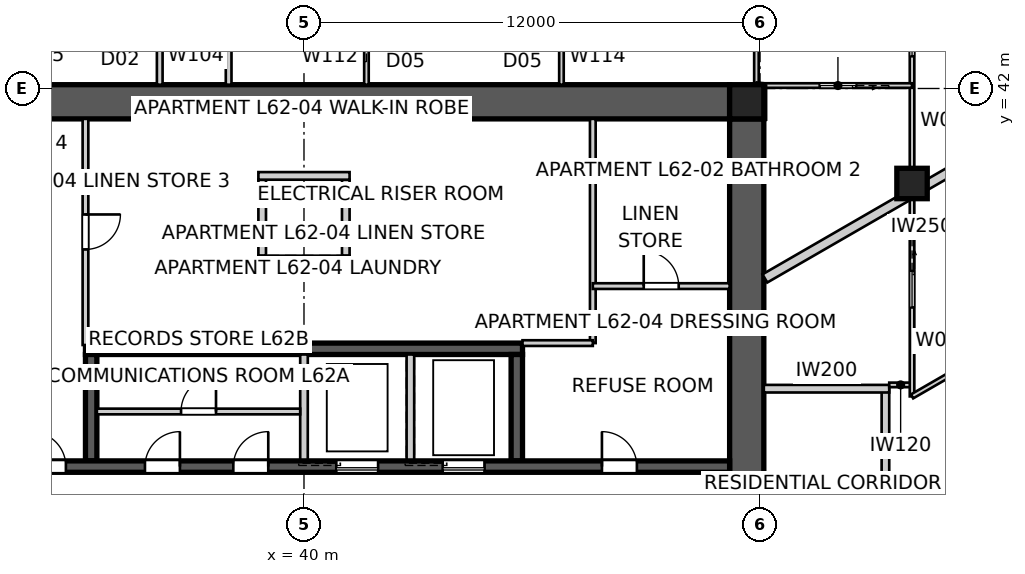
"""IFC4 building model, lengths in metres.
Left out: names, types, materials, properties, quantities, classifications, styles, units other than length and angle.
Written with IfcOpenShell. Run it as: python <this file> out.ifc"""

import sys

from ifc_helpers import new_model, si_unit, direction, frame, frame_2d, origin, origin_2d, place, context, subcontext, project, spatial, polyline, rectangle, outline, extrude, element, fill, save


model = new_model("IFC4")
c1 = context("Model", 3, precision=1e-05, world=origin(), true_north=direction((0.0, 1.0)))
c2 = subcontext(c1, "Body", "Model", "MODEL_VIEW")
j1 = project(units=[si_unit("LENGTHUNIT", "METRE"), si_unit("PLANEANGLEUNIT", "RADIAN")], contexts=[c1])
p1 = place(None, origin())
s1 = spatial("IfcSite", under=j1, at=p1, CompositionType="ELEMENT")
p2 = place(p1, origin())
s2 = spatial("IfcBuilding", under=s1, at=p2, CompositionType="ELEMENT")
p3 = place(p2, frame((0.0, 0.0, 225.2)))
s3 = spatial("IfcBuildingStorey", under=s2, at=p3, CompositionType="ELEMENT", Elevation=225.2)
p4 = place(p3, frame((28.8, 41.65, 0.0), z_axis=(0.0, 0.0, 1.0), x_axis=(1.0, 0.0, 0.0)))
e1 = element("IfcWall", 1, at=p4, inside=s3, PredefinedType="SHEAR", context=c2, shape_type="SweptSolid", body=[
    extrude(outline(polyline([(0.0, -0.45), (22.4, -0.45), (22.4, -0.025), (22.85, -0.025), (22.85, 0.025), (22.4, 0.025), (22.4, 0.45), (0.0, 0.45), (0.0, 0.025), (-0.45, 0.025), (-0.45, -0.025), (0.0, -0.025), (0.0, -0.45)])), origin(), (0.0, 0.0, 1.0), 3.4),
])
p5 = place(p3, frame((51.65, 18.8, 0.0), z_axis=(0.0, 0.0, 1.0), x_axis=(0.0, 1.0, 0.0)))
e2 = element("IfcWall", 2, at=p5, inside=s3, PredefinedType="SHEAR", context=c2, shape_type="SweptSolid", body=[
    extrude(outline(polyline([(0.0, -0.45), (22.4, -0.45), (22.4, -0.025), (22.85, -0.025), (22.85, 0.025), (22.4, 0.025), (22.4, 0.45), (0.0, 0.45), (0.0, 0.025), (-0.45, 0.025), (-0.45, -0.025), (0.0, -0.025), (0.0, -0.45)])), origin(), (0.0, 0.0, 1.0), 3.4),
])
p6 = place(p5, frame((11.14, 0.0, 0.0)))
e3 = element("IfcOpeningElement", 3, at=p6, cuts=e2, PredefinedType="OPENING", context=c2, shape_type="SweptSolid", body=[
    extrude(rectangle(XDim=1.02, YDim=2.4, at=frame_2d((0.51, 1.2))), frame((0.0, 0.46, 0.0), z_axis=(0.0, -1.0, 0.0), x_axis=(1.0, 0.0, 0.0)), (0.0, 0.0, 1.0), 0.92),
])
p7 = place(p3, frame((28.8, 32.05, 0.0), z_axis=(0.0, 0.0, 1.0), x_axis=(1.0, 0.0, 0.0)))
e4 = element("IfcWall", 4, at=p7, inside=s3, PredefinedType="SHEAR", context=c2, shape_type="SweptSolid", body=[
    extrude(rectangle(XDim=22.4, YDim=0.3, at=frame_2d((11.2, 0.0))), origin(), (0.0, 0.0, 1.0), 3.4),
])
p8 = place(p7, frame((19.04, 0.0, 0.0)))
e5 = element("IfcOpeningElement", 5, at=p8, cuts=e4, PredefinedType="OPENING", context=c2, shape_type="SweptSolid", body=[
    extrude(rectangle(XDim=0.92, YDim=2.1, at=frame_2d((0.46, 1.05))), frame((0.0, 0.16, 0.0), z_axis=(0.0, -1.0, 0.0), x_axis=(1.0, 0.0, 0.0)), (0.0, 0.0, 1.0), 0.32),
])
p9 = place(p7, frame((1.265, 0.0, 0.0)))
e6 = element("IfcOpeningElement", 6, at=p9, cuts=e4, PredefinedType="OPENING", context=c2, shape_type="SweptSolid", body=[
    extrude(rectangle(XDim=1.02, YDim=2.1, at=frame_2d((0.51, 1.05))), frame((0.0, 0.16, 0.0), z_axis=(0.0, -1.0, 0.0), x_axis=(1.0, 0.0, 0.0)), (0.0, 0.0, 1.0), 0.32),
])
p10 = place(p7, frame((4.015, 0.0, 0.0)))
e7 = element("IfcOpeningElement", 7, at=p10, cuts=e4, PredefinedType="OPENING", context=c2, shape_type="SweptSolid", body=[
    extrude(rectangle(XDim=0.92, YDim=2.1, at=frame_2d((0.46, 1.05))), frame((0.0, 0.16, 0.0), z_axis=(0.0, -1.0, 0.0), x_axis=(1.0, 0.0, 0.0)), (0.0, 0.0, 1.0), 0.32),
])
p11 = place(p7, frame((7.015, 0.0, 0.0)))
e8 = element("IfcOpeningElement", 8, at=p11, cuts=e4, PredefinedType="OPENING", context=c2, shape_type="SweptSolid", body=[
    extrude(rectangle(XDim=0.92, YDim=2.1, at=frame_2d((0.46, 1.05))), frame((0.0, 0.16, 0.0), z_axis=(0.0, -1.0, 0.0), x_axis=(1.0, 0.0, 0.0)), (0.0, 0.0, 1.0), 0.32),
])
p12 = place(p7, frame((9.34, 0.0, 0.0)))
e9 = element("IfcOpeningElement", 9, at=p12, cuts=e4, PredefinedType="OPENING", context=c2, shape_type="SweptSolid", body=[
    extrude(rectangle(XDim=0.92, YDim=2.1, at=frame_2d((0.46, 1.05))), frame((0.0, 0.16, 0.0), z_axis=(0.0, -1.0, 0.0), x_axis=(1.0, 0.0, 0.0)), (0.0, 0.0, 1.0), 0.32),
])
p13 = place(p7, frame((12.05, 0.0, 0.0)))
e10 = element("IfcOpeningElement", 10, at=p13, cuts=e4, PredefinedType="OPENING", context=c2, shape_type="SweptSolid", body=[
    extrude(rectangle(XDim=1.1, YDim=2.1, at=frame_2d((0.55, 1.05))), frame((0.0, 0.16, 0.0), z_axis=(0.0, -1.0, 0.0), x_axis=(1.0, 0.0, 0.0)), (0.0, 0.0, 1.0), 0.32),
])
p14 = place(p7, frame((14.85, 0.0, 0.0)))
e11 = element("IfcOpeningElement", 11, at=p14, cuts=e4, PredefinedType="OPENING", context=c2, shape_type="SweptSolid", body=[
    extrude(rectangle(XDim=1.1, YDim=2.1, at=frame_2d((0.55, 1.05))), frame((0.0, 0.16, 0.0), z_axis=(0.0, -1.0, 0.0), x_axis=(1.0, 0.0, 0.0)), (0.0, 0.0, 1.0), 0.32),
])
p15 = place(p3, frame((34.25, 35.15, 0.0), z_axis=(0.0, 0.0, 1.0), x_axis=(1.0, 0.0, 0.0)))
e12 = element("IfcWall", 12, at=p15, inside=s3, PredefinedType="SHEAR", context=c2, shape_type="SweptSolid", body=[
    extrude(rectangle(XDim=11.5, YDim=0.3, at=frame_2d((5.75, 0.0))), origin(), (0.0, 0.0, 1.0), 3.4),
])
p16 = place(p3, frame((34.4, 32.2, 0.0), z_axis=(0.0, 0.0, 1.0), x_axis=(0.0, 1.0, 0.0)))
e13 = element("IfcWall", 13, at=p16, inside=s3, PredefinedType="SHEAR", context=c2, shape_type="SweptSolid", body=[
    extrude(rectangle(XDim=2.8, YDim=0.3, at=frame_2d((1.4, 0.0))), origin(), (0.0, 0.0, 1.0), 3.4),
])
for number, where, z_axis, x_axis in (
    (14, (40.0, 32.2, 0.0), (0.0, 0.0, 1.0), (0.0, 1.0, 0.0)),
    (15, (42.8, 32.2, 0.0), (0.0, 0.0, 1.0), (0.0, 1.0, 0.0)),
):
    element("IfcWall", number, at=place(p3, frame(where, z_axis=z_axis, x_axis=x_axis)), inside=s3, PredefinedType="SOLIDWALL", context=c2, shape_type="SweptSolid", body=[
        extrude(rectangle(XDim=2.8, YDim=0.2, at=frame_2d((1.4, 0.0))), origin(), (0.0, 0.0, 1.0), 3.4),
    ])
p17 = place(p3, frame((45.6, 32.2, 0.0), z_axis=(0.0, 0.0, 1.0), x_axis=(0.0, 1.0, 0.0)))
e16 = element("IfcWall", 16, at=p17, inside=s3, PredefinedType="SHEAR", context=c2, shape_type="SweptSolid", body=[
    extrude(rectangle(XDim=2.8, YDim=0.3, at=frame_2d((1.4, 0.0))), origin(), (0.0, 0.0, 1.0), 3.4),
])
for number, where, z_axis, x_axis in (
    (17, (38.9, 37.6, 0.0), (0.0, 0.0, 1.0), (0.0, 1.0, 0.0)),
    (18, (41.1, 37.6, 0.0), (0.0, 0.0, 1.0), (0.0, 1.0, 0.0)),
):
    element("IfcWall", number, at=place(p3, frame(where, z_axis=z_axis, x_axis=x_axis)), inside=s3, PredefinedType="SOLIDWALL", context=c2, shape_type="SweptSolid", body=[
        extrude(rectangle(XDim=2.0, YDim=0.2, at=frame_2d((1.0, 0.0))), origin(), (0.0, 0.0, 1.0), 3.4),
    ])
for number, where, z_axis, x_axis in (
    (19, (38.8, 37.5, 0.0), (0.0, 0.0, 1.0), (1.0, 0.0, 0.0)),
    (20, (38.8, 39.7, 0.0), (0.0, 0.0, 1.0), (1.0, 0.0, 0.0)),
):
    element("IfcWall", number, at=place(p3, frame(where, z_axis=z_axis, x_axis=x_axis)), inside=s3, PredefinedType="SOLIDWALL", context=c2, shape_type="SweptSolid", body=[
        extrude(rectangle(XDim=2.4, YDim=0.2, at=frame_2d((1.2, 0.0))), origin(), (0.0, 0.0, 1.0), 3.4),
    ])
p18 = place(p3, frame((51.65, 41.65, 0.0), z_axis=(0.0, 0.0, 1.0), x_axis=(1.0, 0.0, 0.0)))
e21 = element("IfcColumn", 21, at=p18, inside=s3, PredefinedType="COLUMN", context=c2, shape_type="SweptSolid", body=[
    extrude(rectangle(XDim=0.9, YDim=0.9, at=origin_2d()), origin(), (0.0, 0.0, 1.0), 3.4),
])
p19 = place(p3, frame((56.0, 39.5, 0.0), z_axis=(0.0, 0.0, 1.0), x_axis=(1.0, 0.0, 0.0)))
e22 = element("IfcColumn", 22, at=p19, inside=s3, PredefinedType="COLUMN", context=c2, shape_type="SweptSolid", body=[
    extrude(rectangle(XDim=0.8, YDim=0.8, at=origin_2d()), origin(), (0.0, 0.0, 1.0), 3.4),
])
p20 = place(p3, frame((55.3, 25.9, 0.0), z_axis=(0.0, 0.0, 1.0), x_axis=(0.0, 1.0, 0.0)))
e23 = element("IfcWall", 23, at=p20, inside=s3, PredefinedType="PARTITIONING", context=c2, shape_type="SweptSolid", body=[
    extrude(rectangle(XDim=8.2, YDim=0.2, at=frame_2d((4.1, 0.0))), origin(), (0.0, 0.0, 1.0), 3.25),
])
p21 = place(p3, frame((52.1, 34.1, 0.0), z_axis=(0.0, 0.0, 1.0), x_axis=(1.0, 0.0, 0.0)))
e24 = element("IfcWall", 24, at=p21, inside=s3, PredefinedType="PARTITIONING", context=c2, shape_type="SweptSolid", body=[
    extrude(rectangle(XDim=3.3, YDim=0.2, at=frame_2d((1.65, 0.0))), origin(), (0.0, 0.0, 1.0), 3.25),
])
p22 = place(p3, frame((59.486, 41.25, 0.0), z_axis=(0.0, 0.0, 1.0), x_axis=(-0.866020489494, -0.500008511703, 0.0)))
e25 = element("IfcWall", 25, at=p22, inside=s3, PredefinedType="PARTITIONING", context=c2, shape_type="SweptSolid", body=[
    extrude(rectangle(XDim=8.496, YDim=0.25, at=frame_2d((4.248, 0.0))), origin(), (0.0, 0.0, 1.0), 3.25),
])
p23 = place(p3, frame((64.111, 33.239, 0.0), z_axis=(0.0, 0.0, 1.0), x_axis=(-0.866024190901, -0.50000210077, 0.0)))
e26 = element("IfcWall", 26, at=p23, inside=s3, PredefinedType="PARTITIONING", context=c2, shape_type="SweptSolid", body=[
    extrude(rectangle(XDim=10.026, YDim=0.25, at=frame_2d((5.013, 0.0))), origin(), (0.0, 0.0, 1.0), 3.25),
])
p24 = place(p23, frame((2.229, 0.0, 0.0)))
e27 = element("IfcOpeningElement", 27, at=p24, cuts=e26, PredefinedType="OPENING", context=c2, shape_type="SweptSolid", body=[
    extrude(rectangle(XDim=0.92, YDim=2.34, at=frame_2d((0.46, 1.17))), frame((0.0, 0.135, 0.0), z_axis=(0.0, -1.0, 0.0), x_axis=(1.0, 0.0, 0.0)), (0.0, 0.0, 1.0), 0.27),
])
p25 = place(p3, frame((34.25, 41.2, 0.0), z_axis=(0.0, 0.0, 1.0), x_axis=(0.0, -1.0, 0.0)))
e28 = element("IfcWall", 28, at=p25, inside=s3, PredefinedType="SOLIDWALL", context=c2, shape_type="SweptSolid", body=[
    extrude(rectangle(XDim=5.95, YDim=0.15, at=frame_2d((2.975, 0.0))), origin(), (0.0, 0.0, 1.0), 3.25),
])
p26 = place(p25, frame((2.515, 0.0, 0.0)))
e29 = element("IfcOpeningElement", 29, at=p26, cuts=e28, PredefinedType="OPENING", context=c2, shape_type="SweptSolid", body=[
    extrude(rectangle(XDim=0.92, YDim=2.1, at=frame_2d((0.46, 1.05))), frame((0.0, 0.085, 0.0), z_axis=(0.0, -1.0, 0.0), x_axis=(1.0, 0.0, 0.0)), (0.0, 0.0, 1.0), 0.17),
])
p27 = place(p3, frame((47.6, 41.2, 0.0), z_axis=(0.0, 0.0, 1.0), x_axis=(0.0, -1.0, 0.0)))
e30 = element("IfcWall", 30, at=p27, inside=s3, PredefinedType="SOLIDWALL", context=c2, shape_type="SweptSolid", body=[
    extrude(rectangle(XDim=5.9, YDim=0.15, at=frame_2d((2.95, 0.0))), origin(), (0.0, 0.0, 1.0), 3.25),
])
p28 = place(p3, frame((47.6, 35.3, 0.0), z_axis=(0.0, 0.0, 1.0), x_axis=(-1.0, 0.0, 0.0)))
e31 = element("IfcWall", 31, at=p28, inside=s3, PredefinedType="SOLIDWALL", context=c2, shape_type="SweptSolid", body=[
    extrude(rectangle(XDim=1.85, YDim=0.15, at=frame_2d((0.925, 0.0))), origin(), (0.0, 0.0, 1.0), 3.25),
])
p29 = place(p3, frame((47.6, 36.8, 0.0), z_axis=(0.0, 0.0, 1.0), x_axis=(1.0, 0.0, 0.0)))
e32 = element("IfcWall", 32, at=p29, inside=s3, PredefinedType="SOLIDWALL", context=c2, shape_type="SweptSolid", body=[
    extrude(rectangle(XDim=3.6, YDim=0.15, at=frame_2d((1.8, 0.0))), origin(), (0.0, 0.0, 1.0), 3.25),
])
p30 = place(p29, frame((1.34, 0.0, 0.0)))
e33 = element("IfcOpeningElement", 33, at=p30, cuts=e32, PredefinedType="OPENING", context=c2, shape_type="SweptSolid", body=[
    extrude(rectangle(XDim=0.92, YDim=2.1, at=frame_2d((0.46, 1.05))), frame((0.0, 0.085, 0.0), z_axis=(0.0, -1.0, 0.0), x_axis=(1.0, 0.0, 0.0)), (0.0, 0.0, 1.0), 0.17),
])
p31 = place(p3, frame((56.0, 34.2, 0.0), z_axis=(0.0, 0.0, 1.0), x_axis=(-1.0, 0.0, 0.0)))
e34 = element("IfcWall", 34, at=p31, inside=s3, PredefinedType="PARTITIONING", context=c2, shape_type="SweptSolid", body=[
    extrude(rectangle(XDim=0.6, YDim=0.12, at=frame_2d((0.3, 0.0))), origin(), (0.0, 0.0, 1.0), 3.25),
])
p32 = place(p3, frame((56.0, 44.578, 0.0), z_axis=(0.0, 0.0, 1.0), x_axis=(0.0, -1.0, 0.0)))
e35 = element("IfcWall", 35, at=p32, inside=s3, PredefinedType="PARTITIONING", context=c2, shape_type="SweptSolid", body=[
    extrude(rectangle(XDim=10.681, YDim=0.12, at=frame_2d((5.34, 0.0))), origin(), (0.0, 0.0, 1.0), 2.55),
])
p33 = place(p32, frame((0.77, 0.0, 0.0)))
e36 = element("IfcOpeningElement", 36, at=p33, cuts=e35, PredefinedType="OPENING", context=c2, shape_type="SweptSolid", body=[
    extrude(rectangle(XDim=0.96, YDim=2.1, at=frame_2d((0.48, 1.05))), frame((0.0, 0.07, 0.0), z_axis=(0.0, -1.0, 0.0), x_axis=(1.0, 0.0, 0.0)), (0.0, 0.0, 1.0), 0.14),
])
p34 = place(p32, frame((7.379, 0.0, 0.0)))
e37 = element("IfcOpeningElement", 37, at=p34, cuts=e35, PredefinedType="OPENING", context=c2, shape_type="SweptSolid", body=[
    extrude(rectangle(XDim=0.96, YDim=2.1, at=frame_2d((0.48, 1.05))), frame((0.0, 0.07, 0.0), z_axis=(0.0, -1.0, 0.0), x_axis=(1.0, 0.0, 0.0)), (0.0, 0.0, 1.0), 0.14),
])
p35 = place(p3, frame((56.0, 33.897, 0.0), z_axis=(0.0, 0.0, 1.0), x_axis=(0.866033470286, 0.49998602815, 0.0)))
e38 = element("IfcWall", 38, at=p35, inside=s3, PredefinedType="PARTITIONING", context=c2, shape_type="SweptSolid", body=[
    extrude(rectangle(XDim=6.655, YDim=0.12, at=frame_2d((3.328, 0.0))), origin(), (0.0, 0.0, 1.0), 3.25),
])
p36 = place(p35, frame((2.887, 0.0, 0.0)))
e39 = element("IfcOpeningElement", 39, at=p36, cuts=e38, PredefinedType="OPENING", context=c2, shape_type="SweptSolid", body=[
    extrude(rectangle(XDim=0.92, YDim=2.34, at=frame_2d((0.46, 1.17))), frame((0.0, 0.07, 0.0), z_axis=(0.0, -1.0, 0.0), x_axis=(1.0, 0.0, 0.0)), (0.0, 0.0, 1.0), 0.14),
])
p37 = place(p3, frame((36.204, 46.0, 0.0), z_axis=(0.0, 0.0, 1.0), x_axis=(0.0, -1.0, 0.0)))
e40 = element("IfcWall", 40, at=p37, inside=s3, PredefinedType="SOLIDWALL", context=c2, shape_type="SweptSolid", body=[
    extrude(rectangle(XDim=3.9, YDim=0.15, at=frame_2d((1.95, 0.0))), origin(), (0.0, 0.0, 1.0), 3.25),
])
p38 = place(p37, frame((1.49, 0.0, 0.0)))
e41 = element("IfcOpeningElement", 41, at=p38, cuts=e40, PredefinedType="OPENING", context=c2, shape_type="SweptSolid", body=[
    extrude(rectangle(XDim=0.92, YDim=2.34, at=frame_2d((0.46, 1.17))), frame((0.0, 0.085, 0.0), z_axis=(0.0, -1.0, 0.0), x_axis=(1.0, 0.0, 0.0)), (0.0, 0.0, 1.0), 0.17),
])
p39 = place(p3, frame((56.0, 42.078, 0.0), z_axis=(0.0, 0.0, 1.0), x_axis=(-1.0, 0.0, 0.0)))
e42 = element("IfcWall", 42, at=p39, inside=s3, PredefinedType="PARTITIONING", context=c2, shape_type="SweptSolid", body=[
    extrude(rectangle(XDim=3.9, YDim=0.12, at=frame_2d((1.95, 0.0))), origin(), (0.0, 0.0, 1.0), 3.25),
])
p40 = place(p39, frame((1.47, 0.0, 0.0)))
e43 = element("IfcOpeningElement", 43, at=p40, cuts=e42, PredefinedType="OPENING", context=c2, shape_type="SweptSolid", body=[
    extrude(rectangle(XDim=0.96, YDim=2.1, at=frame_2d((0.48, 1.05))), frame((0.0, 0.07, 0.0), z_axis=(0.0, -1.0, 0.0), x_axis=(1.0, 0.0, 0.0)), (0.0, 0.0, 1.0), 0.14),
])
p41 = place(p3, frame((51.906, 42.1, 0.0), z_axis=(0.0, 0.0, 1.0), x_axis=(0.0, 1.0, 0.0)))
e44 = element("IfcWall", 44, at=p41, inside=s3, PredefinedType="PARTITIONING", context=c2, shape_type="SweptSolid", body=[
    extrude(rectangle(XDim=3.9, YDim=0.12, at=frame_2d((1.95, 0.0))), origin(), (0.0, 0.0, 1.0), 3.25),
])
p42 = place(p3, frame((52.1, 41.18, 0.0), z_axis=(0.0, 0.0, 1.0), x_axis=(0.0, 1.0, 0.0)))
e45 = element("IfcWall", 45, at=p42, inside=s3, PredefinedType="PARTITIONING", context=c2, shape_type="SweptSolid", body=[
    extrude(rectangle(XDim=0.898, YDim=0.12, at=frame_2d((0.449, 0.0))), origin(), (0.0, 0.0, 1.0), 3.25),
])
p43 = place(p3, frame((41.644, 42.1, 0.0), z_axis=(0.0, 0.0, 1.0), x_axis=(0.0, 1.0, 0.0)))
e46 = element("IfcWall", 46, at=p43, inside=s3, PredefinedType="PARTITIONING", context=c2, shape_type="SweptSolid", body=[
    extrude(rectangle(XDim=3.9, YDim=0.12, at=frame_2d((1.95, 0.0))), origin(), (0.0, 0.0, 1.0), 3.25),
])
p44 = place(p43, frame((1.47, 0.0, 0.0)))
e47 = element("IfcOpeningElement", 47, at=p44, cuts=e46, PredefinedType="OPENING", context=c2, shape_type="SweptSolid", body=[
    extrude(rectangle(XDim=0.96, YDim=2.1, at=frame_2d((0.48, 1.05))), frame((0.0, 0.07, 0.0), z_axis=(0.0, -1.0, 0.0), x_axis=(1.0, 0.0, 0.0)), (0.0, 0.0, 1.0), 0.14),
])
p45 = place(p3, frame((46.775, 46.0, 0.0), z_axis=(0.0, 0.0, 1.0), x_axis=(0.0, -1.0, 0.0)))
e48 = element("IfcWall", 48, at=p45, inside=s3, PredefinedType="PARTITIONING", context=c2, shape_type="SweptSolid", body=[
    extrude(rectangle(XDim=3.9, YDim=0.12, at=frame_2d((1.95, 0.0))), origin(), (0.0, 0.0, 1.0), 3.25),
])
p46 = place(p45, frame((1.47, 0.0, 0.0)))
e49 = element("IfcOpeningElement", 49, at=p46, cuts=e48, PredefinedType="OPENING", context=c2, shape_type="SweptSolid", body=[
    extrude(rectangle(XDim=0.96, YDim=2.1, at=frame_2d((0.48, 1.05))), frame((0.0, 0.07, 0.0), z_axis=(0.0, -1.0, 0.0), x_axis=(1.0, 0.0, 0.0)), (0.0, 0.0, 1.0), 0.14),
])
p47 = place(p3, frame((38.017, 42.1, 0.0), z_axis=(0.0, 0.0, 1.0), x_axis=(0.0, 1.0, 0.0)))
e50 = element("IfcWall", 50, at=p47, inside=s3, PredefinedType="SOLIDWALL", context=c2, shape_type="SweptSolid", body=[
    extrude(rectangle(XDim=3.9, YDim=0.15, at=frame_2d((1.95, 0.0))), origin(), (0.0, 0.0, 1.0), 3.25),
])
p48 = place(p3, frame((51.906, 42.1, 0.0), z_axis=(0.0, 0.0, 1.0), x_axis=(0.993387055489, -0.114813579278, 0.0)))
e51 = element("IfcWall", 51, at=p48, inside=s3, PredefinedType="PARTITIONING", context=c2, shape_type="SweptSolid", body=[
    extrude(rectangle(XDim=0.196, YDim=0.12, at=frame_2d((0.098, 0.0))), origin(), (0.0, 0.0, 1.0), 3.25),
])
p49 = place(p3, frame((34.55, 33.5, 0.0), z_axis=(0.0, 0.0, 1.0), x_axis=(1.0, 0.0, 0.0)))
e52 = element("IfcWall", 52, at=p49, inside=s3, PredefinedType="SOLIDWALL", context=c2, shape_type="SweptSolid", body=[
    extrude(rectangle(XDim=5.35, YDim=0.15, at=frame_2d((2.675, 0.0))), origin(), (0.0, 0.0, 1.0), 3.25),
])
p50 = place(p49, frame((2.215, 0.0, 0.0)))
e53 = element("IfcOpeningElement", 53, at=p50, cuts=e52, PredefinedType="OPENING", context=c2, shape_type="SweptSolid", body=[
    extrude(rectangle(XDim=0.92, YDim=2.1, at=frame_2d((0.46, 1.05))), frame((0.0, 0.085, 0.0), z_axis=(0.0, -1.0, 0.0), x_axis=(1.0, 0.0, 0.0)), (0.0, 0.0, 1.0), 0.17),
])
p51 = place(p8, origin())
e54 = element("IfcDoor", 54, at=p51, inside=s3, OperationType="SINGLE_SWING_LEFT", PredefinedType="DOOR", context=c2, shape_type="SweptSolid", body=[
    extrude(rectangle(XDim=0.92, YDim=2.1, at=frame_2d((0.46, 1.05))), frame((0.0, 0.025, 0.0), z_axis=(0.0, -1.0, 0.0), x_axis=(1.0, 0.0, 0.0)), (0.0, 0.0, 1.0), 0.05),
])
fill(e5, e54)
p52 = place(p10, origin())
e55 = element("IfcDoor", 55, at=p52, inside=s3, OperationType="SINGLE_SWING_LEFT", PredefinedType="DOOR", context=c2, shape_type="SweptSolid", body=[
    extrude(rectangle(XDim=0.92, YDim=2.1, at=frame_2d((0.46, 1.05))), frame((0.0, 0.025, 0.0), z_axis=(0.0, -1.0, 0.0), x_axis=(1.0, 0.0, 0.0)), (0.0, 0.0, 1.0), 0.05),
])
fill(e7, e55)
p53 = place(p30, origin())
e56 = element("IfcDoor", 56, at=p53, inside=s3, OperationType="SINGLE_SWING_LEFT", PredefinedType="DOOR", context=c2, shape_type="SweptSolid", body=[
    extrude(rectangle(XDim=0.92, YDim=2.1, at=frame_2d((0.46, 1.05))), frame((0.0, 0.025, 0.0), z_axis=(0.0, -1.0, 0.0), x_axis=(1.0, 0.0, 0.0)), (0.0, 0.0, 1.0), 0.05),
])
fill(e33, e56)
p54 = place(p26, origin())
e57 = element("IfcDoor", 57, at=p54, inside=s3, OperationType="SINGLE_SWING_LEFT", PredefinedType="DOOR", context=c2, shape_type="SweptSolid", body=[
    extrude(rectangle(XDim=0.92, YDim=2.1, at=frame_2d((0.46, 1.05))), frame((0.0, 0.025, 0.0), z_axis=(0.0, -1.0, 0.0), x_axis=(1.0, 0.0, 0.0)), (0.0, 0.0, 1.0), 0.05),
])
fill(e29, e57)
p55 = place(p40, origin())
e58 = element("IfcDoor", 58, at=p55, inside=s3, OperationType="SLIDING_TO_LEFT", PredefinedType="DOOR", context=c2, shape_type="SweptSolid", body=[
    extrude(rectangle(XDim=0.96, YDim=2.1, at=frame_2d((0.48, 1.05))), frame((0.0, 0.025, 0.0), z_axis=(0.0, -1.0, 0.0), x_axis=(1.0, 0.0, 0.0)), (0.0, 0.0, 1.0), 0.05),
])
fill(e43, e58)
p56 = place(p33, origin())
e59 = element("IfcDoor", 59, at=p56, inside=s3, OperationType="SLIDING_TO_LEFT", PredefinedType="DOOR", context=c2, shape_type="SweptSolid", body=[
    extrude(rectangle(XDim=0.96, YDim=2.1, at=frame_2d((0.48, 1.05))), frame((0.0, 0.025, 0.0), z_axis=(0.0, -1.0, 0.0), x_axis=(1.0, 0.0, 0.0)), (0.0, 0.0, 1.0), 0.05),
])
fill(e36, e59)
p57 = place(p34, origin())
e60 = element("IfcDoor", 60, at=p57, inside=s3, OperationType="SLIDING_TO_LEFT", PredefinedType="DOOR", context=c2, shape_type="SweptSolid", body=[
    extrude(rectangle(XDim=0.96, YDim=2.1, at=frame_2d((0.48, 1.05))), frame((0.0, 0.025, 0.0), z_axis=(0.0, -1.0, 0.0), x_axis=(1.0, 0.0, 0.0)), (0.0, 0.0, 1.0), 0.05),
])
fill(e37, e60)
p58 = place(p11, origin())
e61 = element("IfcDoor", 61, at=p58, inside=s3, OperationType="SINGLE_SWING_RIGHT", PredefinedType="DOOR", context=c2, shape_type="SweptSolid", body=[
    extrude(rectangle(XDim=0.92, YDim=2.1, at=frame_2d((0.46, 1.05))), frame((0.0, 0.025, 0.0), z_axis=(0.0, -1.0, 0.0), x_axis=(1.0, 0.0, 0.0)), (0.0, 0.0, 1.0), 0.05),
])
fill(e8, e61)
p59 = place(p12, origin())
e62 = element("IfcDoor", 62, at=p59, inside=s3, OperationType="SINGLE_SWING_RIGHT", PredefinedType="DOOR", context=c2, shape_type="SweptSolid", body=[
    extrude(rectangle(XDim=0.92, YDim=2.1, at=frame_2d((0.46, 1.05))), frame((0.0, 0.025, 0.0), z_axis=(0.0, -1.0, 0.0), x_axis=(1.0, 0.0, 0.0)), (0.0, 0.0, 1.0), 0.05),
])
fill(e9, e62)
p60 = place(p50, origin())
e63 = element("IfcDoor", 63, at=p60, inside=s3, OperationType="SINGLE_SWING_RIGHT", PredefinedType="DOOR", context=c2, shape_type="SweptSolid", body=[
    extrude(rectangle(XDim=0.92, YDim=2.1, at=frame_2d((0.46, 1.05))), frame((0.0, 0.025, 0.0), z_axis=(0.0, -1.0, 0.0), x_axis=(1.0, 0.0, 0.0)), (0.0, 0.0, 1.0), 0.05),
])
fill(e53, e63)
p61 = place(p13, origin())
e64 = element("IfcDoor", 64, at=p61, inside=s3, OperationType="SLIDING_TO_LEFT", PredefinedType="DOOR", context=c2, shape_type="SweptSolid", body=[
    extrude(rectangle(XDim=1.1, YDim=2.1, at=frame_2d((0.55, 1.05))), frame((0.0, 0.025, 0.0), z_axis=(0.0, -1.0, 0.0), x_axis=(1.0, 0.0, 0.0)), (0.0, 0.0, 1.0), 0.05),
])
fill(e10, e64)
p62 = place(p14, origin())
e65 = element("IfcDoor", 65, at=p62, inside=s3, OperationType="SLIDING_TO_LEFT", PredefinedType="DOOR", context=c2, shape_type="SweptSolid", body=[
    extrude(rectangle(XDim=1.1, YDim=2.1, at=frame_2d((0.55, 1.05))), frame((0.0, 0.025, 0.0), z_axis=(0.0, -1.0, 0.0), x_axis=(1.0, 0.0, 0.0)), (0.0, 0.0, 1.0), 0.05),
])
fill(e11, e65)
save(model, sys.argv[1])
